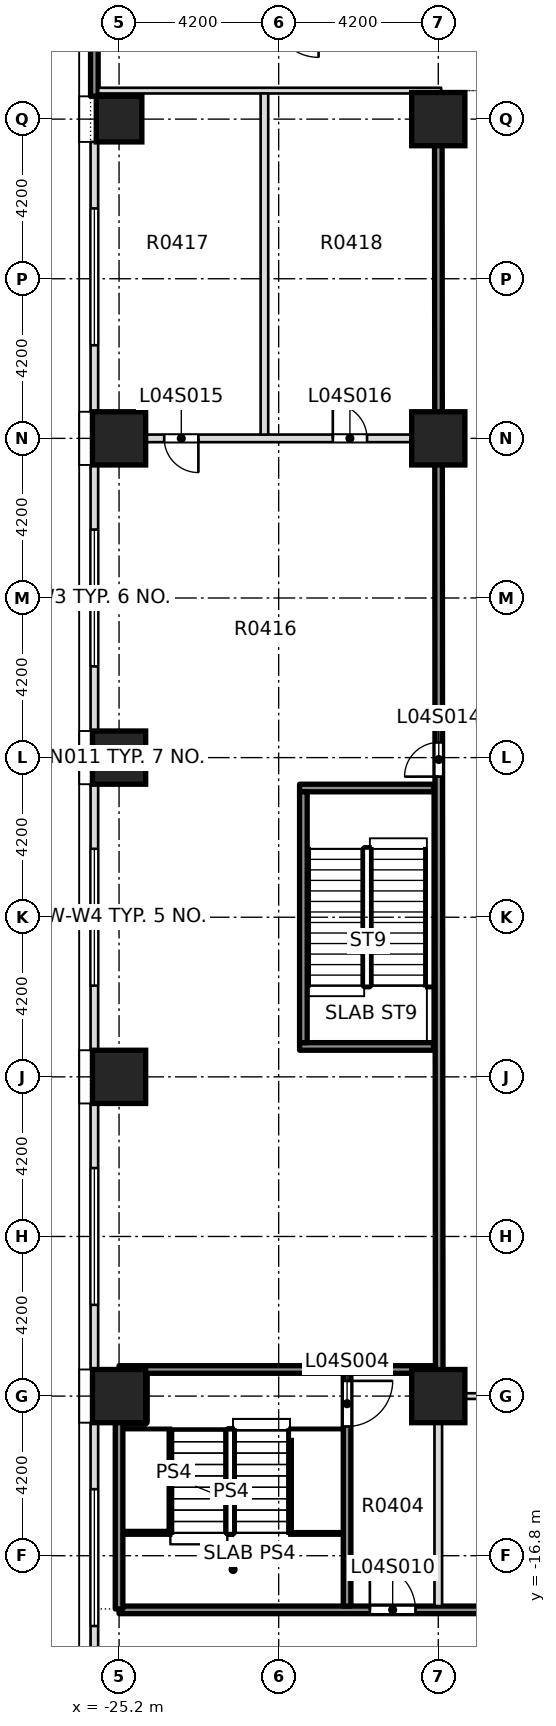
"""IFC4 building model, lengths in metres.
Left out: names, types, materials, properties, quantities, classifications, styles, units other than length and angle.
Written with IfcOpenShell. Run it as: python <this file> out.ifc"""

import sys

from ifc_helpers import new_model, si_unit, direction, frame, frame_2d, origin, origin_2d, place, context, subcontext, project, spatial, rectangle, extrude, element, fill, save


model = new_model("IFC4")
c1 = context("Model", 3, precision=1e-05, world=origin(), true_north=direction((0.0, 1.0)))
c2 = subcontext(c1, "Body", "Model", "MODEL_VIEW")
j1 = project(units=[si_unit("LENGTHUNIT", "METRE"), si_unit("PLANEANGLEUNIT", "RADIAN")], contexts=[c1])
p1 = place(None, origin())
s1 = spatial("IfcSite", under=j1, at=p1, CompositionType="ELEMENT")
p2 = place(p1, origin())
s2 = spatial("IfcBuilding", under=s1, at=p2, CompositionType="ELEMENT")
p3 = place(p2, frame((0.0, 0.0, 25.0)))
s3 = spatial("IfcBuildingStorey", under=s2, at=p3, CompositionType="ELEMENT", Elevation=25.0)
for number, where, z_axis, x_axis in (
    (1, (-25.2, -12.6, -0.4), (0.0, 0.0, 1.0), (1.0, 0.0, 0.0)),
    (2, (-16.8, -12.6, -0.4), (0.0, 0.0, 1.0), (1.0, 0.0, 0.0)),
    (3, (-25.2, -4.2, -0.4), (0.0, 0.0, 1.0), (1.0, 0.0, 0.0)),
    (4, (-25.2, 4.2, -0.4), (0.0, 0.0, 1.0), (1.0, 0.0, 0.0)),
    (5, (-25.2, 12.6, -0.4), (0.0, 0.0, 1.0), (1.0, 0.0, 0.0)),
    (6, (-16.8, 12.6, -0.4), (0.0, 0.0, 1.0), (1.0, 0.0, 0.0)),
    (7, (-16.8, 21.0, -0.4), (0.0, 0.0, 1.0), (1.0, 0.0, 0.0)),
):
    element("IfcColumn", number, at=place(p3, frame(where, z_axis=z_axis, x_axis=x_axis)), inside=s3, PredefinedType="COLUMN", context=c2, shape_type="SweptSolid", body=[
        extrude(rectangle(XDim=1.4, YDim=1.4, at=origin_2d()), origin(), (0.0, 0.0, 1.0), 5.0),
    ])
p4 = place(p3, frame((-25.2, 21.0, 0.0), z_axis=(0.0, 0.0, 1.0), x_axis=(1.0, 0.0, 0.0)))
e8 = element("IfcColumn", 8, at=p4, inside=s3, PredefinedType="COLUMN", context=c2, shape_type="SweptSolid", body=[
    extrude(rectangle(XDim=1.2, YDim=1.2, at=origin_2d()), origin(), (0.0, 0.0, 1.0), 5.0),
])
p5 = place(p3, frame((-25.2, -18.225, 0.0), z_axis=(0.0, 0.0, 1.0), x_axis=(1.0, 0.0, 0.0)))
e9 = element("IfcWall", 9, at=p5, inside=s3, PredefinedType="SOLIDWALL", context=c2, shape_type="SweptSolid", body=[
    extrude(rectangle(XDim=12.95, YDim=0.2, at=frame_2d((6.475, 0.0))), origin(), (0.0, 0.0, 1.0), 4.6),
])
p6 = place(p5, frame((6.6, 0.0, 0.0)))
e10 = element("IfcOpeningElement", 10, at=p6, cuts=e9, PredefinedType="OPENING", context=c2, shape_type="SweptSolid", body=[
    extrude(rectangle(XDim=1.2, YDim=2.1, at=frame_2d((0.6, 1.05))), frame((0.0, 0.11, 0.0), z_axis=(0.0, -1.0, 0.0), x_axis=(1.0, 0.0, 0.0)), (0.0, 0.0, 1.0), 0.22),
])
p7 = place(p5, frame((10.425, 0.0, 0.0)))
e11 = element("IfcOpeningElement", 11, at=p7, cuts=e9, PredefinedType="OPENING", context=c2, shape_type="SweptSolid", body=[
    extrude(rectangle(XDim=0.7, YDim=2.1, at=frame_2d((0.35, 1.05))), frame((0.0, 0.11, 0.0), z_axis=(0.0, -1.0, 0.0), x_axis=(1.0, 0.0, 0.0)), (0.0, 0.0, 1.0), 0.22),
])
p8 = place(p3, frame((-16.9, -12.6, 0.0), z_axis=(0.0, 0.0, 1.0), x_axis=(1.0, 0.0, 0.0)))
e12 = element("IfcWall", 12, at=p8, inside=s3, PredefinedType="PARTITIONING", context=c2, shape_type="SweptSolid", body=[
    extrude(rectangle(XDim=9.625, YDim=0.15, at=frame_2d((4.812, 0.0))), origin(), (0.0, 0.0, 1.0), 4.6),
])
p9 = place(p3, frame((-25.2, -11.9, 0.0), z_axis=(0.0, 0.0, 1.0), x_axis=(1.0, 0.0, 0.0)))
e13 = element("IfcWall", 13, at=p9, inside=s3, PredefinedType="SOLIDWALL", context=c2, shape_type="SweptSolid", body=[
    extrude(rectangle(XDim=8.325, YDim=0.2, at=frame_2d((4.163, 0.0))), origin(), (0.0, 0.0, 1.0), 4.6),
])
p10 = place(p3, frame((-25.75, 12.6, 0.0), z_axis=(0.0, 0.0, 1.0), x_axis=(1.0, 0.0, 0.0)))
e14 = element("IfcWall", 14, at=p10, inside=s3, PredefinedType="PARTITIONING", context=c2, shape_type="SweptSolid", body=[
    extrude(rectangle(XDim=8.875, YDim=0.2, at=frame_2d((4.438, 0.0))), origin(), (0.0, 0.0, 1.0), 4.6),
])
p11 = place(p10, frame((1.738, 0.0, 0.0)))
e15 = element("IfcOpeningElement", 15, at=p11, cuts=e14, PredefinedType="OPENING", context=c2, shape_type="SweptSolid", body=[
    extrude(rectangle(XDim=0.9, YDim=2.1, at=frame_2d((0.45, 1.05))), frame((0.0, 0.11, 0.0), z_axis=(0.0, -1.0, 0.0), x_axis=(1.0, 0.0, 0.0)), (0.0, 0.0, 1.0), 0.22),
])
p12 = place(p10, frame((6.175, 0.0, 0.0)))
e16 = element("IfcOpeningElement", 16, at=p12, cuts=e14, PredefinedType="OPENING", context=c2, shape_type="SweptSolid", body=[
    extrude(rectangle(XDim=0.9, YDim=2.1, at=frame_2d((0.45, 1.05))), frame((0.0, 0.11, 0.0), z_axis=(0.0, -1.0, 0.0), x_axis=(1.0, 0.0, 0.0)), (0.0, 0.0, 1.0), 0.22),
])
p13 = place(p3, frame((-25.75, 21.75, 0.0), z_axis=(0.0, 0.0, 1.0), x_axis=(1.0, 0.0, 0.0)))
e17 = element("IfcWall", 17, at=p13, inside=s3, PredefinedType="PARTITIONING", context=c2, shape_type="SweptSolid", body=[
    extrude(rectangle(XDim=9.025, YDim=0.15, at=frame_2d((4.512, 0.0))), origin(), (0.0, 0.0, 1.0), 4.6),
])
p14 = place(p3, frame((-21.375, 12.7, 0.0), z_axis=(0.0, 0.0, 1.0), x_axis=(0.0, 1.0, 0.0)))
e18 = element("IfcWall", 18, at=p14, inside=s3, PredefinedType="PARTITIONING", context=c2, shape_type="SweptSolid", body=[
    extrude(rectangle(XDim=8.975, YDim=0.2, at=frame_2d((4.488, 0.0))), origin(), (0.0, 0.0, 1.0), 4.6),
])
p15 = place(p3, frame((-19.2, -18.125, 0.0), z_axis=(0.0, 0.0, 1.0), x_axis=(0.0, 1.0, 0.0)))
e19 = element("IfcWall", 19, at=p15, inside=s3, PredefinedType="SOLIDWALL", context=c2, shape_type="SweptSolid", body=[
    extrude(rectangle(XDim=6.125, YDim=0.2, at=frame_2d((3.062, 0.0))), origin(), (0.0, 0.0, 1.0), 4.6),
])
p16 = place(p15, frame((4.725, 0.0, 0.0)))
e20 = element("IfcOpeningElement", 20, at=p16, cuts=e19, PredefinedType="OPENING", context=c2, shape_type="SweptSolid", body=[
    extrude(rectangle(XDim=1.2, YDim=2.1, at=frame_2d((0.6, 1.05))), frame((0.0, 0.11, 0.0), z_axis=(0.0, -1.0, 0.0), x_axis=(1.0, 0.0, 0.0)), (0.0, 0.0, 1.0), 0.22),
])
p17 = place(p3, frame((-16.8, -18.125, 0.0), z_axis=(0.0, 0.0, 1.0), x_axis=(0.0, 1.0, 0.0)))
e21 = element("IfcWall", 21, at=p17, inside=s3, PredefinedType="PARTITIONING", context=c2, shape_type="SweptSolid", body=[
    extrude(rectangle(XDim=5.45, YDim=0.2, at=frame_2d((2.725, 0.0))), origin(), (0.0, 0.0, 1.0), 4.6),
])
p18 = place(p3, frame((-16.775, -12.525, 0.0), z_axis=(0.0, 0.0, 1.0), x_axis=(-0.000727609751, 0.999999735292, 0.0)))
e22 = element("IfcWall", 22, at=p18, inside=s3, PredefinedType="SOLIDWALL", context=c2, shape_type="SweptSolid", body=[
    extrude(rectangle(XDim=34.225, YDim=0.2, at=frame_2d((17.112, 0.0))), origin(), (0.0, 0.0, 1.0), 4.6),
])
p19 = place(p18, frame((16.225, 0.0, 0.0)))
e23 = element("IfcOpeningElement", 23, at=p19, cuts=e22, PredefinedType="OPENING", context=c2, shape_type="SweptSolid", body=[
    extrude(rectangle(XDim=0.9, YDim=2.1, at=frame_2d((0.45, 1.05))), frame((0.0, 0.11, 0.0), z_axis=(0.0, -1.0, 0.0), x_axis=(1.0, 0.0, 0.0)), (0.0, 0.0, 1.0), 0.22),
])
p20 = place(p3, frame((-25.85, 21.6, 0.0), z_axis=(0.0, 0.0, 1.0), x_axis=(0.0, 1.0, 0.0)))
e24 = element("IfcWall", 24, at=p20, inside=s3, PredefinedType="SOLIDWALL", context=c2, shape_type="SweptSolid", body=[
    extrude(rectangle(XDim=7.2, YDim=0.2, at=frame_2d((3.6, 0.0))), origin(), (0.0, 0.0, 1.0), 4.6),
])
p21 = place(p20, frame((2.47, 0.0, 0.9)))
e25 = element("IfcOpeningElement", 25, at=p21, cuts=e24, PredefinedType="OPENING", context=c2, shape_type="SweptSolid", body=[
    extrude(rectangle(XDim=3.6, YDim=2.8, at=frame_2d((1.8, 1.4))), frame((0.0, 0.11, 0.0), z_axis=(0.0, -1.0, 0.0), x_axis=(1.0, 0.0, 0.0)), (0.0, 0.0, 1.0), 0.22),
])
p22 = place(p3, frame((-25.85, 20.4, 0.0), z_axis=(0.0, 0.0, 1.0), x_axis=(0.0, -1.0, 0.0)))
e26 = element("IfcWall", 26, at=p22, inside=s3, PredefinedType="STANDARD", context=c2, shape_type="SweptSolid", body=[
    extrude(rectangle(XDim=7.1, YDim=0.2, at=frame_2d((3.55, 0.0))), origin(), (0.0, 0.0, 1.0), 4.6),
])
p23 = place(p22, frame((1.75, 0.0, 0.9)))
e27 = element("IfcOpeningElement", 27, at=p23, cuts=e26, PredefinedType="OPENING", context=c2, shape_type="SweptSolid", body=[
    extrude(rectangle(XDim=3.6, YDim=2.8, at=frame_2d((1.8, 1.4))), frame((0.0, 0.11, 0.0), z_axis=(0.0, -1.0, 0.0), x_axis=(1.0, 0.0, 0.0)), (0.0, 0.0, 1.0), 0.22),
])
p24 = place(p3, frame((-25.85, 11.9, 0.0), z_axis=(0.0, 0.0, 1.0), x_axis=(0.0, -1.0, 0.0)))
e28 = element("IfcWall", 28, at=p24, inside=s3, PredefinedType="STANDARD", context=c2, shape_type="SweptSolid", body=[
    extrude(rectangle(XDim=7.0, YDim=0.2, at=frame_2d((3.5, 0.0))), origin(), (0.0, 0.0, 1.0), 4.6),
])
p25 = place(p24, frame((1.7, 0.0, 0.9)))
e29 = element("IfcOpeningElement", 29, at=p25, cuts=e28, PredefinedType="OPENING", context=c2, shape_type="SweptSolid", body=[
    extrude(rectangle(XDim=3.6, YDim=2.8, at=frame_2d((1.8, 1.4))), frame((0.0, 0.11, 0.0), z_axis=(0.0, -1.0, 0.0), x_axis=(1.0, 0.0, 0.0)), (0.0, 0.0, 1.0), 0.22),
])
p26 = place(p3, frame((-25.85, 3.5, 0.0), z_axis=(0.0, 0.0, 1.0), x_axis=(0.0, -1.0, 0.0)))
e30 = element("IfcWall", 30, at=p26, inside=s3, PredefinedType="STANDARD", context=c2, shape_type="SweptSolid", body=[
    extrude(rectangle(XDim=7.0, YDim=0.2, at=frame_2d((3.5, 0.0))), origin(), (0.0, 0.0, 1.0), 4.6),
])
p27 = place(p26, frame((1.7, 0.0, 0.9)))
e31 = element("IfcOpeningElement", 31, at=p27, cuts=e30, PredefinedType="OPENING", context=c2, shape_type="SweptSolid", body=[
    extrude(rectangle(XDim=3.6, YDim=2.8, at=frame_2d((1.8, 1.4))), frame((0.0, 0.11, 0.0), z_axis=(0.0, -1.0, 0.0), x_axis=(1.0, 0.0, 0.0)), (0.0, 0.0, 1.0), 0.22),
])
p28 = place(p3, frame((-25.85, -4.9, 0.0), z_axis=(0.0, 0.0, 1.0), x_axis=(0.0, -1.0, 0.0)))
e32 = element("IfcWall", 32, at=p28, inside=s3, PredefinedType="STANDARD", context=c2, shape_type="SweptSolid", body=[
    extrude(rectangle(XDim=7.0, YDim=0.2, at=frame_2d((3.5, 0.0))), origin(), (0.0, 0.0, 1.0), 4.6),
])
p29 = place(p28, frame((1.7, 0.0, 0.9)))
e33 = element("IfcOpeningElement", 33, at=p29, cuts=e32, PredefinedType="OPENING", context=c2, shape_type="SweptSolid", body=[
    extrude(rectangle(XDim=3.6, YDim=2.8, at=frame_2d((1.8, 1.4))), frame((0.0, 0.11, 0.0), z_axis=(0.0, -1.0, 0.0), x_axis=(1.0, 0.0, 0.0)), (0.0, 0.0, 1.0), 0.22),
])
p30 = place(p3, frame((-25.85, -13.3, 0.0), z_axis=(0.0, 0.0, 1.0), x_axis=(0.0, -1.0, 0.0)))
e34 = element("IfcWall", 34, at=p30, inside=s3, PredefinedType="STANDARD", context=c2, shape_type="SweptSolid", body=[
    extrude(rectangle(XDim=7.1, YDim=0.2, at=frame_2d((3.55, 0.0))), origin(), (0.0, 0.0, 1.0), 4.6),
])
p31 = place(p30, frame((1.75, 0.0, 0.9)))
e35 = element("IfcOpeningElement", 35, at=p31, cuts=e34, PredefinedType="OPENING", context=c2, shape_type="SweptSolid", body=[
    extrude(rectangle(XDim=3.6, YDim=2.8, at=frame_2d((1.8, 1.4))), frame((0.0, 0.11, 0.0), z_axis=(0.0, -1.0, 0.0), x_axis=(1.0, 0.0, 0.0)), (0.0, 0.0, 1.0), 0.22),
])
for number, where, z_axis, x_axis in (
    (36, (-20.45, -3.4, 0.0), (0.0, 0.0, 1.0), (1.0, 0.0, 0.0)),
    (37, (-20.45, 3.4, 0.0), (0.0, 0.0, 1.0), (1.0, 0.0, 0.0)),
):
    element("IfcWall", number, at=place(p3, frame(where, z_axis=z_axis, x_axis=x_axis)), inside=s3, PredefinedType="SOLIDWALL", context=c2, shape_type="SweptSolid", body=[
        extrude(rectangle(XDim=3.525, YDim=0.2, at=frame_2d((1.762, 0.0))), origin(), (0.0, 0.0, 1.0), 4.6),
    ])
p32 = place(p3, frame((-25.2, -18.2, 0.0), z_axis=(0.0, 0.0, 1.0), x_axis=(0.0, 1.0, 0.0)))
e38 = element("IfcWall", 38, at=p32, inside=s3, PredefinedType="SOLIDWALL", context=c2, shape_type="SweptSolid", body=[
    extrude(rectangle(XDim=5.3, YDim=0.2, at=frame_2d((2.65, 0.0))), origin(), (0.0, 0.0, 1.0), 4.6),
])
p33 = place(p3, frame((-20.35, -3.3, 0.0), z_axis=(0.0, 0.0, 1.0), x_axis=(0.0, 1.0, 0.0)))
e39 = element("IfcWall", 39, at=p33, inside=s3, PredefinedType="SOLIDWALL", context=c2, shape_type="SweptSolid", body=[
    extrude(rectangle(XDim=6.6, YDim=0.2, at=frame_2d((3.3, 0.0))), origin(), (0.0, 0.0, 1.0), 4.6),
])
p34 = place(p16, origin())
e40 = element("IfcDoor", 40, at=p34, inside=s3, OperationType="DOUBLE_DOOR_SINGLE_SWING", PredefinedType="DOOR", context=c2, shape_type="SweptSolid", body=[
    extrude(rectangle(XDim=1.2, YDim=2.1, at=frame_2d((0.6, 1.05))), frame((0.0, 0.025, 0.0), z_axis=(0.0, -1.0, 0.0), x_axis=(1.0, 0.0, 0.0)), (0.0, 0.0, 1.0), 0.05),
])
fill(e20, e40)
p35 = place(p6, origin())
e41 = element("IfcDoor", 41, at=p35, inside=s3, OperationType="SINGLE_SWING_RIGHT", PredefinedType="DOOR", context=c2, shape_type="SweptSolid", body=[
    extrude(rectangle(XDim=1.2, YDim=2.1, at=frame_2d((0.6, 1.05))), frame((0.0, 0.025, 0.0), z_axis=(0.0, -1.0, 0.0), x_axis=(1.0, 0.0, 0.0)), (0.0, 0.0, 1.0), 0.05),
])
fill(e10, e41)
p36 = place(p19, origin())
e42 = element("IfcDoor", 42, at=p36, inside=s3, OperationType="SINGLE_SWING_LEFT", PredefinedType="DOOR", context=c2, shape_type="SweptSolid", body=[
    extrude(rectangle(XDim=0.9, YDim=2.1, at=frame_2d((0.45, 1.05))), frame((0.0, 0.025, 0.0), z_axis=(0.0, -1.0, 0.0), x_axis=(1.0, 0.0, 0.0)), (0.0, 0.0, 1.0), 0.05),
])
fill(e23, e42)
p37 = place(p11, origin())
e43 = element("IfcDoor", 43, at=p37, inside=s3, OperationType="SINGLE_SWING_RIGHT", PredefinedType="DOOR", context=c2, shape_type="SweptSolid", body=[
    extrude(rectangle(XDim=0.9, YDim=2.1, at=frame_2d((0.45, 1.05))), frame((0.0, 0.025, 0.0), z_axis=(0.0, -1.0, 0.0), x_axis=(1.0, 0.0, 0.0)), (0.0, 0.0, 1.0), 0.05),
])
fill(e15, e43)
p38 = place(p12, origin())
e44 = element("IfcDoor", 44, at=p38, inside=s3, OperationType="SINGLE_SWING_LEFT", PredefinedType="DOOR", context=c2, shape_type="SweptSolid", body=[
    extrude(rectangle(XDim=0.9, YDim=2.1, at=frame_2d((0.45, 1.05))), frame((0.0, 0.025, 0.0), z_axis=(0.0, -1.0, 0.0), x_axis=(1.0, 0.0, 0.0)), (0.0, 0.0, 1.0), 0.05),
])
fill(e16, e44)
p39 = place(p23, origin())
e45 = element("IfcWindow", 45, at=p39, inside=s3, PartitioningType="SINGLE_PANEL", PredefinedType="WINDOW", context=c2, shape_type="SweptSolid", body=[
    extrude(rectangle(XDim=3.6, YDim=2.8, at=frame_2d((1.8, 1.4))), frame((0.0, 0.03, 0.0), z_axis=(0.0, -1.0, 0.0), x_axis=(1.0, 0.0, 0.0)), (0.0, 0.0, 1.0), 0.06),
])
fill(e27, e45)
p40 = place(p25, origin())
e46 = element("IfcWindow", 46, at=p40, inside=s3, PartitioningType="SINGLE_PANEL", PredefinedType="WINDOW", context=c2, shape_type="SweptSolid", body=[
    extrude(rectangle(XDim=3.6, YDim=2.8, at=frame_2d((1.8, 1.4))), frame((0.0, 0.03, 0.0), z_axis=(0.0, -1.0, 0.0), x_axis=(1.0, 0.0, 0.0)), (0.0, 0.0, 1.0), 0.06),
])
fill(e29, e46)
p41 = place(p27, origin())
e47 = element("IfcWindow", 47, at=p41, inside=s3, PartitioningType="SINGLE_PANEL", PredefinedType="WINDOW", context=c2, shape_type="SweptSolid", body=[
    extrude(rectangle(XDim=3.6, YDim=2.8, at=frame_2d((1.8, 1.4))), frame((0.0, 0.03, 0.0), z_axis=(0.0, -1.0, 0.0), x_axis=(1.0, 0.0, 0.0)), (0.0, 0.0, 1.0), 0.06),
])
fill(e31, e47)
p42 = place(p29, origin())
e48 = element("IfcWindow", 48, at=p42, inside=s3, PartitioningType="SINGLE_PANEL", PredefinedType="WINDOW", context=c2, shape_type="SweptSolid", body=[
    extrude(rectangle(XDim=3.6, YDim=2.8, at=frame_2d((1.8, 1.4))), frame((0.0, 0.03, 0.0), z_axis=(0.0, -1.0, 0.0), x_axis=(1.0, 0.0, 0.0)), (0.0, 0.0, 1.0), 0.06),
])
fill(e33, e48)
p43 = place(p31, origin())
e49 = element("IfcWindow", 49, at=p43, inside=s3, PartitioningType="SINGLE_PANEL", PredefinedType="WINDOW", context=c2, shape_type="SweptSolid", body=[
    extrude(rectangle(XDim=3.6, YDim=2.8, at=frame_2d((1.8, 1.4))), frame((0.0, 0.03, 0.0), z_axis=(0.0, -1.0, 0.0), x_axis=(1.0, 0.0, 0.0)), (0.0, 0.0, 1.0), 0.06),
])
fill(e35, e49)
save(model, sys.argv[1])
